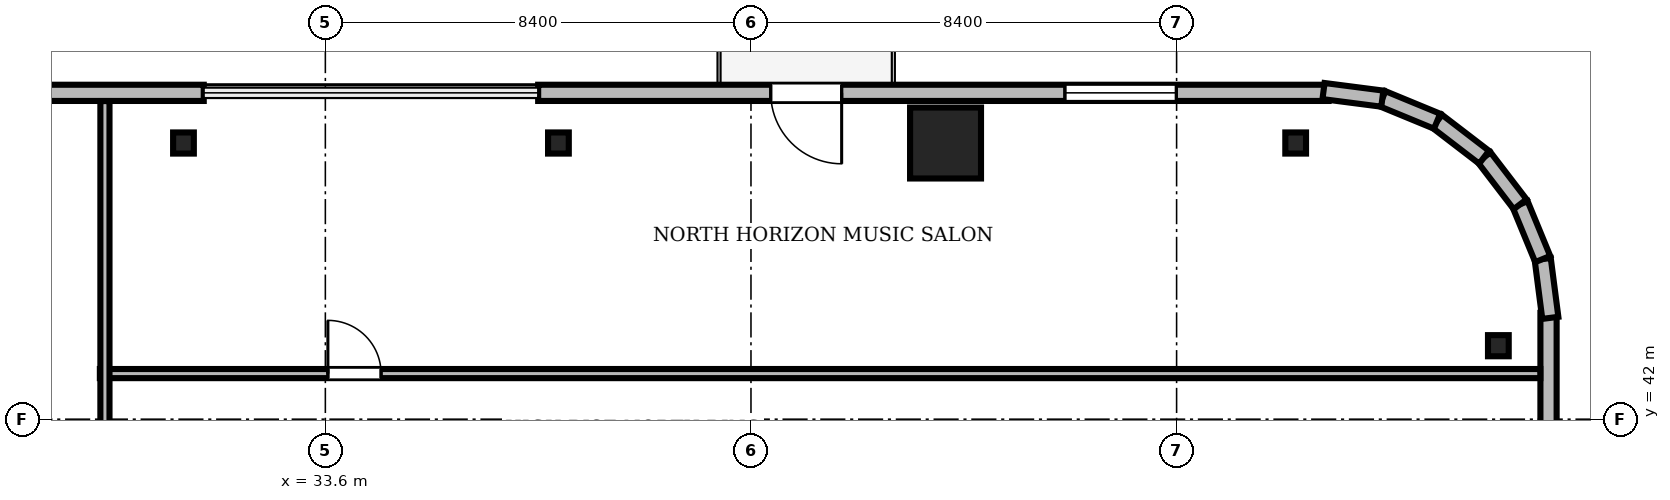
"""IFC4 building model, lengths in metres.
Left out: names, types, materials, properties, quantities, classifications, styles, units other than length and angle.
Written with IfcOpenShell. Run it as: python <this file> out.ifc"""

import sys

from ifc_helpers import new_model, si_unit, direction, frame, frame_2d, origin, origin_2d, place, context, subcontext, project, spatial, rectangle, i_section, extrude, source, transform, mapped, element, fill, save


model = new_model("IFC4")
c1 = context("Model", 3, precision=1e-05, world=origin(), true_north=direction((0.0, 1.0)))
c2 = subcontext(c1, "Body", "Model", "MODEL_VIEW")
j1 = project(units=[si_unit("LENGTHUNIT", "METRE"), si_unit("PLANEANGLEUNIT", "RADIAN")], contexts=[c1])
p1 = place(None, origin())
s1 = spatial("IfcSite", under=j1, at=p1, CompositionType="ELEMENT")
p2 = place(p1, origin())
s2 = spatial("IfcBuilding", under=s1, at=p2, CompositionType="ELEMENT")
p3 = place(p2, frame((0.0, 0.0, 177.2)))
s3 = spatial("IfcBuildingStorey", under=s2, at=p3, CompositionType="ELEMENT", Elevation=177.2)
m1 = source(origin(), c2, "Body", "SweptSolid", [
    extrude(rectangle(XDim=1.4, YDim=1.4, at=origin_2d()), origin(), (0.0, 0.0, 1.0), 3.58),
])
p4 = place(p3, frame((45.84, 47.45, 0.0), z_axis=(0.0, 0.0, 1.0), x_axis=(1.0, 0.0, 0.0)))
e1 = element("IfcColumn", 1, at=p4, inside=s3, PredefinedType="COLUMN", context=c2, shape_type="MappedRepresentation", body=[
    mapped(m1, transform((0.0, 0.0, 0.0), scale=1.0)),
])
m2 = source(origin(), c2, "Body", "SweptSolid", [
    extrude(i_section(OverallWidth=0.409, OverallDepth=0.417, WebThickness=0.021, FlangeThickness=0.033, FilletRadius=0.015, at=origin_2d()), origin(), (0.0, 0.0, 1.0), 3.58),
])
for number, where, z_axis, x_axis in (
    (2, (56.75, 43.45, 0.0), (0.0, 0.0, 1.0), (1.0, 0.0, 0.0)),
    (3, (52.75, 47.45, 0.0), (0.0, 0.0, 1.0), (1.0, 0.0, 0.0)),
    (4, (38.2, 47.45, 0.0), (0.0, 0.0, 1.0), (1.0, 0.0, 0.0)),
    (5, (30.8, 47.45, 0.0), (0.0, 0.0, 1.0), (1.0, 0.0, 0.0)),
):
    element("IfcColumn", number, at=place(p3, frame(where, z_axis=z_axis, x_axis=x_axis)), inside=s3, PredefinedType="COLUMN", context=c2, shape_type="MappedRepresentation", body=[
        mapped(m2, transform((0.0, 0.0, 0.0), scale=1.0)),
    ])
m3 = source(origin(), c2, "Body", "SweptSolid", [
    extrude(rectangle(XDim=15.6, YDim=0.32, at=frame_2d((7.8, 0.0))), origin(), (0.0, 0.0, 1.0), 3.58),
])
p5 = place(p3, frame((53.4, 48.44, 0.0), z_axis=(0.0, 0.0, 1.0), x_axis=(-1.0, 0.0, 0.0)))
e6 = element("IfcWall", 6, at=p5, inside=s3, PredefinedType="SOLIDWALL", context=c2, shape_type="MappedRepresentation", body=[
    mapped(m3, transform((0.0, 0.0, 0.0), scale=1.0)),
])
m4 = source(origin(), c2, "Body", "SweptSolid", [
    extrude(rectangle(XDim=1.4, YDim=2.3, at=frame_2d((0.7, 1.15))), frame((0.0, 0.17, 0.0), z_axis=(0.0, -1.0, 0.0), x_axis=(1.0, 0.0, 0.0)), (0.0, 0.0, 1.0), 0.34),
])
p6 = place(p5, frame((9.61, 0.0, 0.0)))
e7 = element("IfcOpeningElement", 7, at=p6, cuts=e6, PredefinedType="OPENING", context=c2, shape_type="MappedRepresentation", body=[
    mapped(m4, transform((0.0, 0.0, 0.0), scale=1.0)),
])
m5 = source(origin(), c2, "Body", "SweptSolid", [
    extrude(rectangle(XDim=2.2, YDim=2.4, at=frame_2d((1.1, 1.2))), frame((0.0, 0.17, 0.0), z_axis=(0.0, -1.0, 0.0), x_axis=(1.0, 0.0, 0.0)), (0.0, 0.0, 1.0), 0.34),
])
p7 = place(p5, frame((3.005, 0.0, 0.72)))
e8 = element("IfcOpeningElement", 8, at=p7, cuts=e6, PredefinedType="OPENING", context=c2, shape_type="MappedRepresentation", body=[
    mapped(m5, transform((0.0, 0.0, 0.0), scale=1.0)),
])
p8 = place(p3, frame((31.2, 48.44, 0.0), z_axis=(0.0, 0.0, 1.0), x_axis=(-1.0, 0.0, 0.0)))
e9 = element("IfcWall", 9, at=p8, inside=s3, PredefinedType="SOLIDWALL", context=c2, shape_type="MappedRepresentation", body=[
    mapped(m3, transform((0.0, 0.0, 0.0), scale=1.0)),
])
p9 = place(p8, frame((10.395, 0.0, 0.72)))
e10 = element("IfcOpeningElement", 10, at=p9, cuts=e9, PredefinedType="OPENING", context=c2, shape_type="MappedRepresentation", body=[
    mapped(m5, transform((0.0, 0.0, 0.0), scale=1.0)),
])
m6 = source(origin(), c2, "Body", "SweptSolid", [
    extrude(rectangle(XDim=15.6, YDim=0.32, at=frame_2d((7.8, 0.0))), origin(), (0.0, 0.0, 1.0), 3.58),
])
p10 = place(p3, frame((57.74, 28.5, 0.0), z_axis=(0.0, 0.0, 1.0), x_axis=(0.0, 1.0, 0.0)))
e11 = element("IfcWall", 11, at=p10, inside=s3, PredefinedType="SOLIDWALL", context=c2, shape_type="MappedRepresentation", body=[
    mapped(m6, transform((0.0, 0.0, 0.0), scale=1.0)),
])
p11 = place(p10, frame((10.395, 0.0, 0.72)))
e12 = element("IfcOpeningElement", 12, at=p11, cuts=e11, PredefinedType="OPENING", context=c2, shape_type="MappedRepresentation", body=[
    mapped(m5, transform((0.0, 0.0, 0.0), scale=1.0)),
])
m7 = source(origin(), c2, "Body", "SweptSolid", [
    extrude(rectangle(XDim=1.17, YDim=0.32, at=frame_2d((0.585, 0.0))), origin(), (0.0, 0.0, 1.0), 3.58),
])
p12 = place(p3, frame((57.776, 44.0, 0.0), z_axis=(0.0, 0.0, 1.0), x_axis=(-0.128295670475, 0.991735963317, 0.0)))
e13 = element("IfcWall", 13, at=p12, inside=s3, PredefinedType="SOLIDWALL", context=c2, shape_type="MappedRepresentation", body=[
    mapped(m7, transform((0.0, 0.0, 0.0), scale=1.0)),
])
m8 = source(origin(), c2, "Body", "SweptSolid", [
    extrude(rectangle(XDim=1.169, YDim=0.32, at=frame_2d((0.584, 0.0))), origin(), (0.0, 0.0, 1.0), 3.58),
])
p13 = place(p3, frame((57.625, 45.16, 0.0), z_axis=(0.0, 0.0, 1.0), x_axis=(-0.381054331552, 0.924552646638, 0.0)))
e14 = element("IfcWall", 14, at=p13, inside=s3, PredefinedType="SOLIDWALL", context=c2, shape_type="MappedRepresentation", body=[
    mapped(m8, transform((0.0, 0.0, 0.0), scale=1.0)),
])
m9 = source(origin(), c2, "Body", "SweptSolid", [
    extrude(rectangle(XDim=1.169, YDim=0.32, at=frame_2d((0.584, 0.0))), origin(), (0.0, 0.0, 1.0), 3.58),
])
p14 = place(p3, frame((57.18, 46.241, 0.0), z_axis=(0.0, 0.0, 1.0), x_axis=(-0.608387696831, 0.793639975269, 0.0)))
e15 = element("IfcWall", 15, at=p14, inside=s3, PredefinedType="SOLIDWALL", context=c2, shape_type="MappedRepresentation", body=[
    mapped(m9, transform((0.0, 0.0, 0.0), scale=1.0)),
])
m10 = source(origin(), c2, "Body", "SweptSolid", [
    extrude(rectangle(XDim=1.169, YDim=0.32, at=frame_2d((0.584, 0.0))), origin(), (0.0, 0.0, 1.0), 3.58),
])
p15 = place(p3, frame((56.469, 47.169, 0.0), z_axis=(0.0, 0.0, 1.0), x_axis=(-0.793663520347, 0.608356981114, 0.0)))
e16 = element("IfcWall", 16, at=p15, inside=s3, PredefinedType="SOLIDWALL", context=c2, shape_type="MappedRepresentation", body=[
    mapped(m10, transform((0.0, 0.0, 0.0), scale=1.0)),
])
p16 = place(p3, frame((55.541, 47.88, 0.0), z_axis=(0.0, 0.0, 1.0), x_axis=(-0.924552646638, 0.381054331552, 0.0)))
e17 = element("IfcWall", 17, at=p16, inside=s3, PredefinedType="SOLIDWALL", context=c2, shape_type="MappedRepresentation", body=[
    mapped(m8, transform((0.0, 0.0, 0.0), scale=1.0)),
])
p17 = place(p3, frame((54.46, 48.325, 0.0), z_axis=(0.0, 0.0, 1.0), x_axis=(-0.991735963317, 0.128295670475, 0.0)))
e18 = element("IfcWall", 18, at=p17, inside=s3, PredefinedType="SOLIDWALL", context=c2, shape_type="MappedRepresentation", body=[
    mapped(m7, transform((0.0, 0.0, 0.0), scale=1.0)),
])
m11 = source(origin(), c2, "Body", "SweptSolid", [
    extrude(rectangle(XDim=28.428, YDim=0.18, at=frame_2d((14.214, 0.0))), origin(), (0.0, 0.0, 1.0), 2.822),
])
p18 = place(p3, frame((29.15, 42.9, 0.0), z_axis=(0.0, 0.0, 1.0), x_axis=(1.0, 0.0, 0.0)))
e19 = element("IfcWall", 19, at=p18, inside=s3, PredefinedType="PARTITIONING", context=c2, shape_type="MappedRepresentation", body=[
    mapped(m11, transform((0.0, 0.0, 0.0), scale=1.0)),
])
m12 = source(origin(), c2, "Body", "SweptSolid", [
    extrude(rectangle(XDim=1.05, YDim=2.2, at=frame_2d((0.525, 1.1))), frame((0.0, 0.1, 0.0), z_axis=(0.0, -1.0, 0.0), x_axis=(1.0, 0.0, 0.0)), (0.0, 0.0, 1.0), 0.2),
])
p19 = place(p18, frame((4.5, 0.0, 0.0)))
e20 = element("IfcOpeningElement", 20, at=p19, cuts=e19, PredefinedType="OPENING", context=c2, shape_type="MappedRepresentation", body=[
    mapped(m12, transform((0.0, 0.0, 0.0), scale=1.0)),
])
m13 = source(origin(), c2, "Body", "SweptSolid", [
    extrude(rectangle(XDim=11.258, YDim=0.18, at=frame_2d((5.629, 0.0))), origin(), (0.0, 0.0, 1.0), 2.822),
])
p20 = place(p3, frame((29.25, 37.02, 0.0), z_axis=(0.0, 0.0, 1.0), x_axis=(0.0, 1.0, 0.0)))
e21 = element("IfcWall", 21, at=p20, inside=s3, PredefinedType="PARTITIONING", context=c2, shape_type="MappedRepresentation", body=[
    mapped(m13, transform((0.0, 0.0, 0.0), scale=1.0)),
])
m14 = source(origin(), c2, "Body", "SweptSolid", [
    extrude(rectangle(XDim=1.4, YDim=2.3, at=frame_2d((0.7, 1.15))), frame((0.0, 0.025, 0.0), z_axis=(0.0, -1.0, 0.0), x_axis=(1.0, 0.0, 0.0)), (0.0, 0.0, 1.0), 0.05),
])
p21 = place(p6, frame((1.4, 0.0, 0.0), z_axis=(0.0, 0.0, 1.0), x_axis=(-1.0, 0.0, 0.0)))
e22 = element("IfcDoor", 22, at=p21, inside=s3, OperationType="DOUBLE_DOOR_SLIDING", PredefinedType="DOOR", context=c2, shape_type="MappedRepresentation", body=[
    mapped(m14, transform((0.0, 0.0, 0.0), scale=1.0)),
])
fill(e7, e22)
m15 = source(origin(), c2, "Body", "SweptSolid", [
    extrude(rectangle(XDim=2.2, YDim=2.4, at=frame_2d((1.1, 1.2))), frame((0.0, 0.03, 0.0), z_axis=(0.0, -1.0, 0.0), x_axis=(1.0, 0.0, 0.0)), (0.0, 0.0, 1.0), 0.06),
])
p22 = place(p7, origin())
e23 = element("IfcWindow", 23, at=p22, inside=s3, PartitioningType="SINGLE_PANEL", PredefinedType="WINDOW", context=c2, shape_type="MappedRepresentation", body=[
    mapped(m15, transform((0.0, 0.0, 0.0), scale=1.0)),
])
fill(e8, e23)
m16 = source(origin(), c2, "Body", "SweptSolid", [
    extrude(rectangle(XDim=1.05, YDim=2.2, at=frame_2d((0.525, 1.1))), frame((0.0, 0.025, 0.0), z_axis=(0.0, -1.0, 0.0), x_axis=(1.0, 0.0, 0.0)), (0.0, 0.0, 1.0), 0.05),
])
p23 = place(p19, origin())
e24 = element("IfcDoor", 24, at=p23, inside=s3, OperationType="SINGLE_SWING_LEFT", PredefinedType="DOOR", context=c2, shape_type="MappedRepresentation", body=[
    mapped(m16, transform((0.0, 0.0, 0.0), scale=1.0)),
])
fill(e20, e24)
save(model, sys.argv[1])
